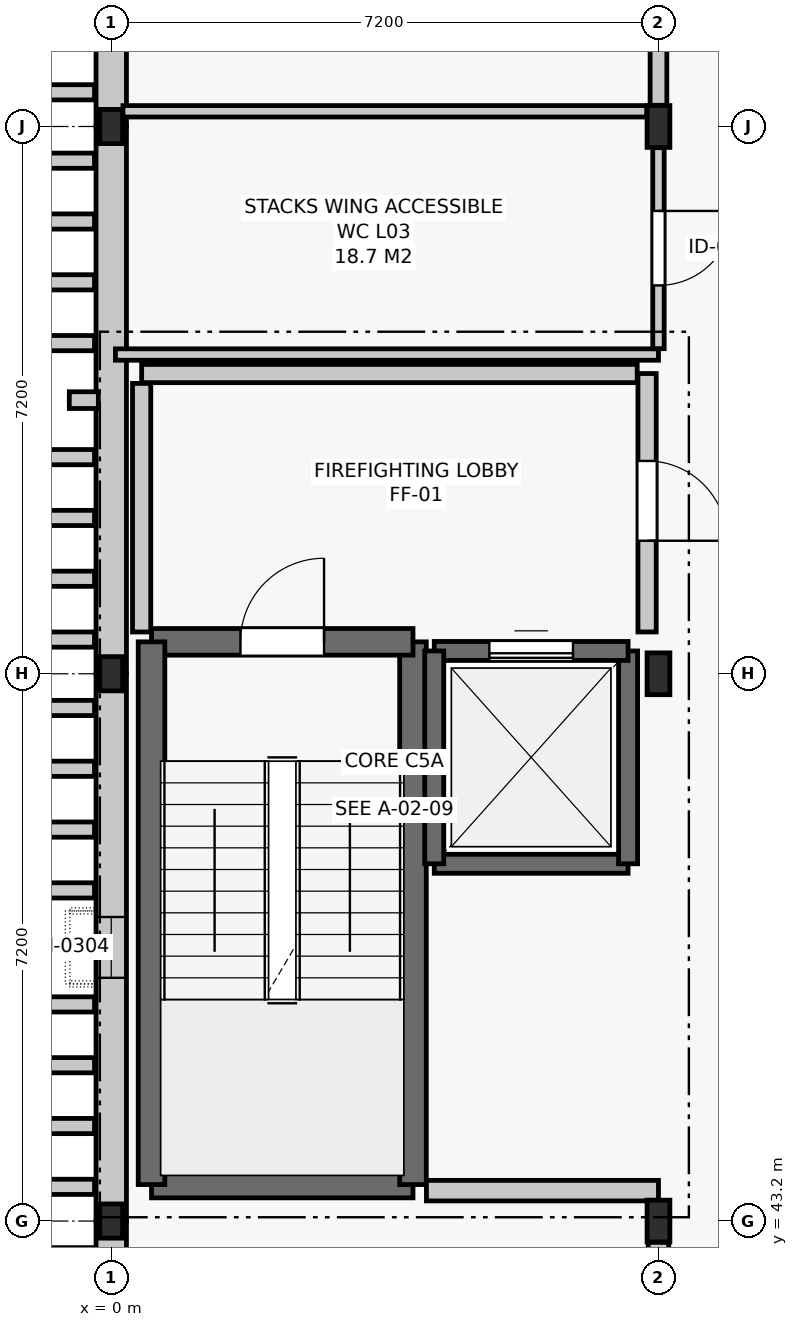
"""IFC4 building model, lengths in metres.
Left out: names, types, materials, properties, quantities, classifications, styles, units other than length and angle.
Written with IfcOpenShell. Run it as: python <this file> out.ifc"""

import sys

from ifc_helpers import new_model, si_unit, direction, frame, frame_2d, origin, origin_2d, place, context, subcontext, project, spatial, rectangle, i_section, extrude, element, fill, save


model = new_model("IFC4")
c1 = context("Model", 3, precision=1e-05, world=origin(), true_north=direction((0.0, 1.0)))
c2 = subcontext(c1, "Body", "Model", "MODEL_VIEW")
j1 = project(units=[si_unit("LENGTHUNIT", "METRE"), si_unit("PLANEANGLEUNIT", "RADIAN")], contexts=[c1])
p1 = place(None, origin())
s1 = spatial("IfcSite", under=j1, at=p1, CompositionType="ELEMENT")
p2 = place(p1, origin())
s2 = spatial("IfcBuilding", under=s1, at=p2, CompositionType="ELEMENT")
p3 = place(p2, frame((0.0, 0.0, 14.4)))
s3 = spatial("IfcBuildingStorey", under=s2, at=p3, CompositionType="ELEMENT", Elevation=14.4)
for number, where, z_axis, x_axis in (
    (1, (0.0, 43.2, 0.0), (0.0, 0.0, 1.0), (1.0, 0.0, 0.0)),
    (2, (0.0, 50.4, 0.0), (0.0, 0.0, 1.0), (1.0, 0.0, 0.0)),
    (3, (0.0, 57.6, 0.0), (0.0, 0.0, 1.0), (1.0, 0.0, 0.0)),
):
    element("IfcColumn", number, at=place(p3, frame(where, z_axis=z_axis, x_axis=x_axis)), inside=s3, PredefinedType="COLUMN", context=c2, shape_type="SweptSolid", body=[
        extrude(i_section(OverallWidth=0.3, OverallDepth=0.45, WebThickness=0.014, FlangeThickness=0.026, FilletRadius=0.027, at=origin_2d()), origin(), (0.0, 0.0, 1.0), 4.2),
    ])
for number, where, z_axis, x_axis in (
    (4, (7.2, 43.2, 0.0), (0.0, 0.0, 1.0), (1.0, 0.0, 0.0)),
    (5, (7.2, 50.4, 0.0), (0.0, 0.0, 1.0), (1.0, 0.0, 0.0)),
    (6, (7.2, 57.6, 0.0), (0.0, 0.0, 1.0), (1.0, 0.0, 0.0)),
):
    element("IfcColumn", number, at=place(p3, frame(where, z_axis=z_axis, x_axis=x_axis)), inside=s3, PredefinedType="COLUMN", context=c2, shape_type="SweptSolid", body=[
        extrude(i_section(OverallWidth=0.3, OverallDepth=0.55, WebThickness=0.015, FlangeThickness=0.029, FilletRadius=0.027, at=origin_2d()), origin(), (0.0, 0.0, 1.0), 4.2),
    ])
p4 = place(p3, frame((0.0, 64.8, 0.0), z_axis=(0.0, 0.0, 1.0), x_axis=(0.0, -1.0, 0.0)))
e7 = element("IfcWall", 7, at=p4, inside=s3, PredefinedType="SOLIDWALL", context=c2, shape_type="SweptSolid", body=[
    extrude(rectangle(XDim=7.2, YDim=0.4, at=frame_2d((3.6, 0.0))), origin(), (0.0, 0.0, 1.0), 3.06),
])
p5 = place(p4, frame((3.2, 0.0, 0.95)))
e8 = element("IfcOpeningElement", 8, at=p5, cuts=e7, PredefinedType="OPENING", context=c2, shape_type="SweptSolid", body=[
    extrude(rectangle(XDim=0.8, YDim=2.15, at=frame_2d((0.4, 1.075))), frame((0.0, 0.212, 0.0), z_axis=(0.0, -1.0, 0.0), x_axis=(1.0, 0.0, 0.0)), (0.0, 0.0, 1.0), 0.424),
])
p6 = place(p3, frame((0.0, 57.6, 0.0), z_axis=(0.0, 0.0, 1.0), x_axis=(0.0, -1.0, 0.0)))
e9 = element("IfcWall", 9, at=p6, inside=s3, PredefinedType="SOLIDWALL", context=c2, shape_type="SweptSolid", body=[
    extrude(rectangle(XDim=7.2, YDim=0.4, at=frame_2d((3.6, 0.0))), origin(), (0.0, 0.0, 1.0), 3.06),
])
p7 = place(p3, frame((0.0, 50.4, 0.0), z_axis=(0.0, 0.0, 1.0), x_axis=(0.0, -1.0, 0.0)))
e10 = element("IfcWall", 10, at=p7, inside=s3, PredefinedType="SOLIDWALL", context=c2, shape_type="SweptSolid", body=[
    extrude(rectangle(XDim=7.2, YDim=0.4, at=frame_2d((3.6, 0.0))), origin(), (0.0, 0.0, 1.0), 3.06),
])
p8 = place(p7, frame((3.2, 0.0, 0.95)))
e11 = element("IfcOpeningElement", 11, at=p8, cuts=e10, PredefinedType="OPENING", context=c2, shape_type="SweptSolid", body=[
    extrude(rectangle(XDim=0.8, YDim=2.15, at=frame_2d((0.4, 1.075))), frame((0.0, 0.212, 0.0), z_axis=(0.0, -1.0, 0.0), x_axis=(1.0, 0.0, 0.0)), (0.0, 0.0, 1.0), 0.424),
])
p9 = place(p3, frame((0.0, 43.2, 0.0), z_axis=(0.0, 0.0, 1.0), x_axis=(0.0, -1.0, 0.0)))
e12 = element("IfcWall", 12, at=p9, inside=s3, PredefinedType="SOLIDWALL", context=c2, shape_type="SweptSolid", body=[
    extrude(rectangle(XDim=7.2, YDim=0.4, at=frame_2d((3.6, 0.0))), origin(), (0.0, 0.0, 1.0), 3.06),
])
p10 = place(p9, frame((3.2, 0.0, 0.95)))
e13 = element("IfcOpeningElement", 13, at=p10, cuts=e12, PredefinedType="OPENING", context=c2, shape_type="SweptSolid", body=[
    extrude(rectangle(XDim=0.8, YDim=2.15, at=frame_2d((0.4, 1.075))), frame((0.0, 0.212, 0.0), z_axis=(0.0, -1.0, 0.0), x_axis=(1.0, 0.0, 0.0)), (0.0, 0.0, 1.0), 0.424),
])
for number, where, z_axis, x_axis in (
    (14, (-1.66, 43.65, 0.0), (0.0, 0.0, 1.0), (1.0, 0.0, 0.0)),
    (15, (-1.66, 44.45, 0.0), (0.0, 0.0, 1.0), (1.0, 0.0, 0.0)),
    (16, (-1.66, 45.25, 0.0), (0.0, 0.0, 1.0), (1.0, 0.0, 0.0)),
    (17, (-1.66, 46.05, 0.0), (0.0, 0.0, 1.0), (1.0, 0.0, 0.0)),
    (18, (-1.66, 47.55, 0.0), (0.0, 0.0, 1.0), (1.0, 0.0, 0.0)),
    (19, (-1.66, 48.35, 0.0), (0.0, 0.0, 1.0), (1.0, 0.0, 0.0)),
    (20, (-1.66, 49.15, 0.0), (0.0, 0.0, 1.0), (1.0, 0.0, 0.0)),
    (21, (-1.66, 49.95, 0.0), (0.0, 0.0, 1.0), (1.0, 0.0, 0.0)),
    (22, (-1.66, 50.85, 0.0), (0.0, 0.0, 1.0), (1.0, 0.0, 0.0)),
    (23, (-1.66, 51.65, 0.0), (0.0, 0.0, 1.0), (1.0, 0.0, 0.0)),
    (24, (-1.66, 52.45, 0.0), (0.0, 0.0, 1.0), (1.0, 0.0, 0.0)),
    (25, (-1.66, 53.25, 0.0), (0.0, 0.0, 1.0), (1.0, 0.0, 0.0)),
    (26, (-1.66, 54.75, 0.0), (0.0, 0.0, 1.0), (1.0, 0.0, 0.0)),
    (27, (-1.66, 55.55, 0.0), (0.0, 0.0, 1.0), (1.0, 0.0, 0.0)),
    (28, (-1.66, 56.35, 0.0), (0.0, 0.0, 1.0), (1.0, 0.0, 0.0)),
    (29, (-1.66, 57.15, 0.0), (0.0, 0.0, 1.0), (1.0, 0.0, 0.0)),
    (30, (-1.66, 58.05, 0.0), (0.0, 0.0, 1.0), (1.0, 0.0, 0.0)),
):
    element("IfcWall", number, at=place(p3, frame(where, z_axis=z_axis, x_axis=x_axis)), inside=s3, PredefinedType="SOLIDWALL", context=c2, shape_type="SweptSolid", body=[
        extrude(rectangle(XDim=1.44, YDim=0.2, at=frame_2d((0.72, 0.0))), origin(), (0.0, 0.0, 1.0), 4.2),
    ])
p11 = place(p3, frame((0.53, 43.68, 0.0), z_axis=(0.0, 0.0, 1.0), x_axis=(1.0, 0.0, 0.0)))
e31 = element("IfcWall", 31, at=p11, inside=s3, PredefinedType="SHEAR", context=c2, shape_type="SweptSolid", body=[
    extrude(rectangle(XDim=3.44, YDim=0.35, at=frame_2d((1.72, 0.0))), origin(), (0.0, 0.0, 1.0), 3.94),
])
p12 = place(p3, frame((3.97, 43.68, 0.0), z_axis=(0.0, 0.0, 1.0), x_axis=(0.0, 1.0, 0.0)))
e32 = element("IfcWall", 32, at=p12, inside=s3, PredefinedType="SHEAR", context=c2, shape_type="SweptSolid", body=[
    extrude(rectangle(XDim=7.14, YDim=0.35, at=frame_2d((3.57, 0.0))), origin(), (0.0, 0.0, 1.0), 3.94),
])
p13 = place(p3, frame((3.97, 50.82, 0.0), z_axis=(0.0, 0.0, 1.0), x_axis=(-1.0, 0.0, 0.0)))
e33 = element("IfcWall", 33, at=p13, inside=s3, PredefinedType="SHEAR", context=c2, shape_type="SweptSolid", body=[
    extrude(rectangle(XDim=3.44, YDim=0.35, at=frame_2d((1.72, 0.0))), origin(), (0.0, 0.0, 1.0), 3.94),
])
p14 = place(p13, frame((1.17, 0.0, 0.0)))
e34 = element("IfcOpeningElement", 34, at=p14, cuts=e33, PredefinedType="OPENING", context=c2, shape_type="SweptSolid", body=[
    extrude(rectangle(XDim=1.1, YDim=2.15, at=frame_2d((0.55, 1.075))), frame((0.0, 0.187, 0.0), z_axis=(0.0, -1.0, 0.0), x_axis=(1.0, 0.0, 0.0)), (0.0, 0.0, 1.0), 0.374),
])
p15 = place(p3, frame((0.53, 50.82, 0.0), z_axis=(0.0, 0.0, 1.0), x_axis=(0.0, -1.0, 0.0)))
e35 = element("IfcWall", 35, at=p15, inside=s3, PredefinedType="SHEAR", context=c2, shape_type="SweptSolid", body=[
    extrude(rectangle(XDim=7.14, YDim=0.35, at=frame_2d((3.57, 0.0))), origin(), (0.0, 0.0, 1.0), 3.94),
])
p16 = place(p3, frame((7.05, 50.95, 0.0), z_axis=(0.0, 0.0, 1.0), x_axis=(0.0, 1.0, 0.0)))
e36 = element("IfcWall", 36, at=p16, inside=s3, PredefinedType="SOLIDWALL", context=c2, shape_type="SweptSolid", body=[
    extrude(rectangle(XDim=3.4, YDim=0.24, at=frame_2d((1.7, 0.0))), origin(), (0.0, 0.0, 1.0), 3.2),
])
p17 = place(p16, frame((1.2, 0.0, 0.0)))
e37 = element("IfcOpeningElement", 37, at=p17, cuts=e36, PredefinedType="OPENING", context=c2, shape_type="SweptSolid", body=[
    extrude(rectangle(XDim=1.05, YDim=2.15, at=frame_2d((0.525, 1.075))), frame((0.0, 0.132, 0.0), z_axis=(0.0, -1.0, 0.0), x_axis=(1.0, 0.0, 0.0)), (0.0, 0.0, 1.0), 0.264),
])
p18 = place(p3, frame((0.4, 54.35, 0.0), z_axis=(0.0, 0.0, 1.0), x_axis=(1.0, 0.0, 0.0)))
e38 = element("IfcWall", 38, at=p18, inside=s3, PredefinedType="SOLIDWALL", context=c2, shape_type="SweptSolid", body=[
    extrude(rectangle(XDim=6.52, YDim=0.24, at=frame_2d((3.26, 0.0))), origin(), (0.0, 0.0, 1.0), 3.2),
])
p19 = place(p3, frame((0.4, 50.95, 0.0), z_axis=(0.0, 0.0, 1.0), x_axis=(0.0, 1.0, 0.0)))
e39 = element("IfcWall", 39, at=p19, inside=s3, PredefinedType="SOLIDWALL", context=c2, shape_type="SweptSolid", body=[
    extrude(rectangle(XDim=3.27, YDim=0.24, at=frame_2d((1.635, 0.0))), origin(), (0.0, 0.0, 1.0), 3.2),
])
p20 = place(p3, frame((4.25, 47.9, 0.0), z_axis=(0.0, 0.0, 1.0), x_axis=(1.0, 0.0, 0.0)))
e40 = element("IfcWall", 40, at=p20, inside=s3, PredefinedType="SHEAR", context=c2, shape_type="SweptSolid", body=[
    extrude(rectangle(XDim=2.55, YDim=0.25, at=frame_2d((1.275, 0.0))), origin(), (0.0, 0.0, 1.0), 3.94),
])
p21 = place(p3, frame((6.8, 47.9, 0.0), z_axis=(0.0, 0.0, 1.0), x_axis=(0.0, 1.0, 0.0)))
e41 = element("IfcWall", 41, at=p21, inside=s3, PredefinedType="SHEAR", context=c2, shape_type="SweptSolid", body=[
    extrude(rectangle(XDim=2.8, YDim=0.25, at=frame_2d((1.4, 0.0))), origin(), (0.0, 0.0, 1.0), 3.94),
])
p22 = place(p3, frame((6.8, 50.7, 0.0), z_axis=(0.0, 0.0, 1.0), x_axis=(-1.0, 0.0, 0.0)))
e42 = element("IfcWall", 42, at=p22, inside=s3, PredefinedType="SHEAR", context=c2, shape_type="SweptSolid", body=[
    extrude(rectangle(XDim=2.55, YDim=0.25, at=frame_2d((1.275, 0.0))), origin(), (0.0, 0.0, 1.0), 3.94),
])
p23 = place(p22, frame((0.725, 0.0, 0.0)))
e43 = element("IfcOpeningElement", 43, at=p23, cuts=e42, PredefinedType="OPENING", context=c2, shape_type="SweptSolid", body=[
    extrude(rectangle(XDim=1.1, YDim=2.1, at=frame_2d((0.55, 1.05))), frame((0.0, 0.137, 0.0), z_axis=(0.0, -1.0, 0.0), x_axis=(1.0, 0.0, 0.0)), (0.0, 0.0, 1.0), 0.274),
])
p24 = place(p3, frame((4.25, 50.7, 0.0), z_axis=(0.0, 0.0, 1.0), x_axis=(0.0, -1.0, 0.0)))
e44 = element("IfcWall", 44, at=p24, inside=s3, PredefinedType="SHEAR", context=c2, shape_type="SweptSolid", body=[
    extrude(rectangle(XDim=2.8, YDim=0.25, at=frame_2d((1.4, 0.0))), origin(), (0.0, 0.0, 1.0), 3.94),
])
p25 = place(p3, frame((0.055, 54.6, 0.0), z_axis=(0.0, 0.0, 1.0), x_axis=(1.0, 0.0, 0.0)))
e45 = element("IfcWall", 45, at=p25, inside=s3, PredefinedType="PARTITIONING", context=c2, shape_type="SweptSolid", body=[
    extrude(rectangle(XDim=7.145, YDim=0.15, at=frame_2d((3.573, 0.0))), origin(), (0.0, 0.0, 1.0), 3.172),
])
p26 = place(p3, frame((0.154, 57.8, 0.0), z_axis=(0.0, 0.0, 1.0), x_axis=(1.0, 0.0, 0.0)))
e46 = element("IfcWall", 46, at=p26, inside=s3, PredefinedType="PARTITIONING", context=c2, shape_type="SweptSolid", body=[
    extrude(rectangle(XDim=6.892, YDim=0.15, at=frame_2d((3.446, 0.0))), origin(), (0.0, 0.0, 1.0), 3.375),
])
p27 = place(p3, frame((4.147, 43.6, 0.0), z_axis=(0.0, 0.0, 1.0), x_axis=(1.0, 0.0, 0.0)))
e47 = element("IfcWall", 47, at=p27, inside=s3, PredefinedType="SOLIDWALL", context=c2, shape_type="SweptSolid", body=[
    extrude(rectangle(XDim=3.053, YDim=0.27, at=frame_2d((1.526, 0.0))), origin(), (0.0, 0.0, 1.0), 3.385),
])
p28 = place(p3, frame((7.2, 54.677, 0.0), z_axis=(0.0, 0.0, 1.0), x_axis=(0.0, 1.0, 0.0)))
e48 = element("IfcWall", 48, at=p28, inside=s3, PredefinedType="PARTITIONING", context=c2, shape_type="SweptSolid", body=[
    extrude(rectangle(XDim=2.644, YDim=0.15, at=frame_2d((1.322, 0.0))), origin(), (0.0, 0.0, 1.0), 3.385),
])
p29 = place(p28, frame((0.832, 0.0, 0.0)))
e49 = element("IfcOpeningElement", 49, at=p29, cuts=e48, PredefinedType="OPENING", context=c2, shape_type="SweptSolid", body=[
    extrude(rectangle(XDim=0.98, YDim=2.1, at=frame_2d((0.49, 1.05))), frame((0.0, 0.087, 0.0), z_axis=(0.0, -1.0, 0.0), x_axis=(1.0, 0.0, 0.0)), (0.0, 0.0, 1.0), 0.174),
])
p30 = place(p3, frame((7.2, 36.279, 0.0), z_axis=(0.0, 0.0, 1.0), x_axis=(0.0, 1.0, 0.0)))
e50 = element("IfcWall", 50, at=p30, inside=s3, PredefinedType="SOLIDWALL", context=c2, shape_type="SweptSolid", body=[
    extrude(rectangle(XDim=6.642, YDim=0.27, at=frame_2d((3.321, 0.0))), origin(), (0.0, 0.0, 1.0), 3.385),
])
p31 = place(p3, frame((7.2, 57.879, 0.0), z_axis=(0.0, 0.0, 1.0), x_axis=(0.0, 1.0, 0.0)))
e51 = element("IfcWall", 51, at=p31, inside=s3, PredefinedType="SOLIDWALL", context=c2, shape_type="SweptSolid", body=[
    extrude(rectangle(XDim=6.642, YDim=0.22, at=frame_2d((3.321, 0.0))), origin(), (0.0, 0.0, 1.0), 3.385),
])
p32 = place(p8, origin())
e52 = element("IfcWindow", 52, at=p32, inside=s3, PartitioningType="SINGLE_PANEL", PredefinedType="WINDOW", context=c2, shape_type="SweptSolid", body=[
    extrude(rectangle(XDim=0.8, YDim=2.15, at=frame_2d((0.4, 1.075))), frame((0.0, 0.03, 0.0), z_axis=(0.0, -1.0, 0.0), x_axis=(1.0, 0.0, 0.0)), (0.0, 0.0, 1.0), 0.06),
])
fill(e11, e52)
p33 = place(p14, frame((1.1, 0.0, 0.0), z_axis=(0.0, 0.0, 1.0), x_axis=(-1.0, 0.0, 0.0)))
e53 = element("IfcDoor", 53, at=p33, inside=s3, OperationType="SINGLE_SWING_RIGHT", PredefinedType="DOOR", context=c2, shape_type="SweptSolid", body=[
    extrude(rectangle(XDim=1.1, YDim=2.15, at=frame_2d((0.55, 1.075))), frame((0.0, 0.025, 0.0), z_axis=(0.0, -1.0, 0.0), x_axis=(1.0, 0.0, 0.0)), (0.0, 0.0, 1.0), 0.05),
])
fill(e34, e53)
p34 = place(p17, frame((1.05, 0.0, 0.0), z_axis=(0.0, 0.0, 1.0), x_axis=(-1.0, 0.0, 0.0)))
e54 = element("IfcDoor", 54, at=p34, inside=s3, OperationType="SINGLE_SWING_RIGHT", PredefinedType="DOOR", context=c2, shape_type="SweptSolid", body=[
    extrude(rectangle(XDim=1.05, YDim=2.15, at=frame_2d((0.525, 1.075))), frame((0.0, 0.025, 0.0), z_axis=(0.0, -1.0, 0.0), x_axis=(1.0, 0.0, 0.0)), (0.0, 0.0, 1.0), 0.05),
])
fill(e37, e54)
p35 = place(p23, origin())
e55 = element("IfcDoor", 55, at=p35, inside=s3, OperationType="SLIDING_TO_RIGHT", PredefinedType="DOOR", context=c2, shape_type="SweptSolid", body=[
    extrude(rectangle(XDim=1.1, YDim=2.1, at=frame_2d((0.55, 1.05))), frame((0.0, 0.025, 0.0), z_axis=(0.0, -1.0, 0.0), x_axis=(1.0, 0.0, 0.0)), (0.0, 0.0, 1.0), 0.05),
])
fill(e43, e55)
p36 = place(p29, frame((0.98, 0.0, 0.0), z_axis=(0.0, 0.0, 1.0), x_axis=(-1.0, 0.0, 0.0)))
e56 = element("IfcDoor", 56, at=p36, inside=s3, OperationType="SINGLE_SWING_LEFT", PredefinedType="DOOR", context=c2, shape_type="SweptSolid", body=[
    extrude(rectangle(XDim=0.98, YDim=2.1, at=frame_2d((0.49, 1.05))), frame((0.0, 0.025, 0.0), z_axis=(0.0, -1.0, 0.0), x_axis=(1.0, 0.0, 0.0)), (0.0, 0.0, 1.0), 0.05),
])
fill(e49, e56)
save(model, sys.argv[1])
